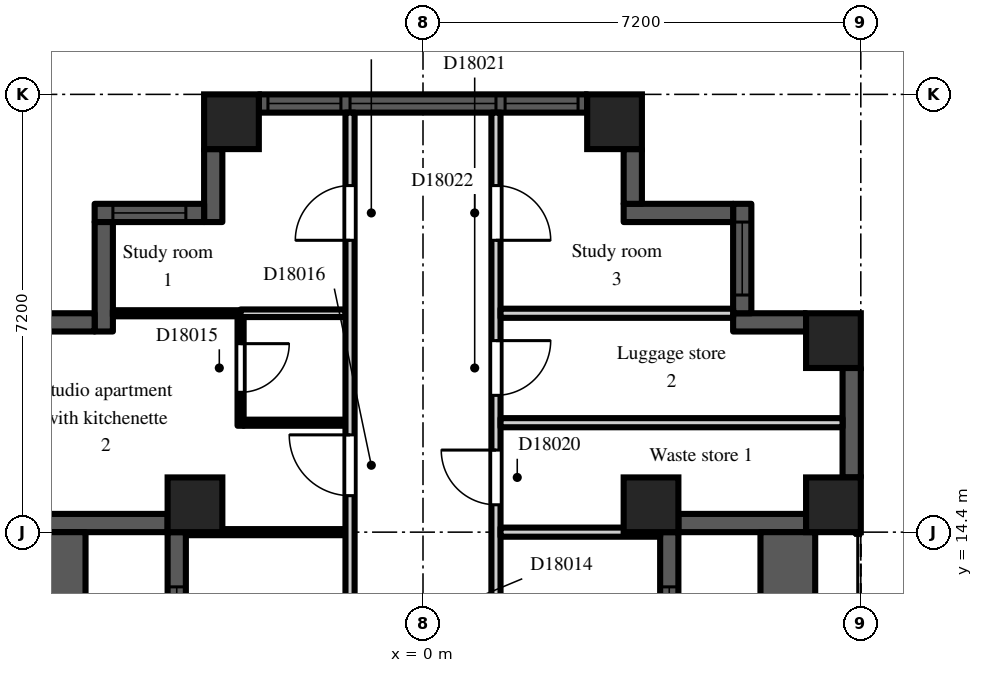
"""IFC4 building model, lengths in metres.
Left out: names, types, materials, properties, quantities, classifications, styles, units other than length and angle.
Written with IfcOpenShell. Run it as: python <this file> out.ifc"""

import sys

from ifc_helpers import new_model, si_unit, direction, frame, frame_2d, origin, origin_2d, place, context, subcontext, project, spatial, rectangle, extrude, element, fill, save


model = new_model("IFC4")
c1 = context("Model", 3, precision=1e-05, world=origin(), true_north=direction((0.0, 1.0)))
c2 = subcontext(c1, "Body", "Model", "MODEL_VIEW")
j1 = project(units=[si_unit("LENGTHUNIT", "METRE"), si_unit("PLANEANGLEUNIT", "RADIAN")], contexts=[c1])
p1 = place(None, origin())
s1 = spatial("IfcSite", under=j1, at=p1, CompositionType="ELEMENT")
p2 = place(p1, origin())
s2 = spatial("IfcBuilding", under=s1, at=p2, CompositionType="ELEMENT")
p3 = place(p2, frame((0.0, 0.0, 123.3)))
s3 = spatial("IfcBuildingStorey", under=s2, at=p3, CompositionType="ELEMENT", Elevation=123.3)
for number, where, z_axis, x_axis in (
    (1, (-3.75, 14.85, 0.0), (0.0, 0.0, 1.0), (1.0, 0.0, 0.0)),
    (2, (-3.15, 21.15, 0.0), (0.0, 0.0, 1.0), (1.0, 0.0, 0.0)),
    (3, (3.15, 21.15, 0.0), (0.0, 0.0, 1.0), (1.0, 0.0, 0.0)),
    (4, (3.75, 14.85, 0.0), (0.0, 0.0, 1.0), (1.0, 0.0, 0.0)),
    (5, (6.75, 14.85, 0.0), (0.0, 0.0, 1.0), (1.0, 0.0, 0.0)),
    (6, (6.75, 17.55, 0.0), (0.0, 0.0, 1.0), (1.0, 0.0, 0.0)),
):
    element("IfcColumn", number, at=place(p3, frame(where, z_axis=z_axis, x_axis=x_axis)), inside=s3, PredefinedType="COLUMN", context=c2, shape_type="SweptSolid", body=[
        extrude(rectangle(XDim=0.9, YDim=0.9, at=origin_2d()), origin(), (0.0, 0.0, 1.0), 3.0),
    ])
p4 = place(p3, frame((4.05, 7.2, 0.0), z_axis=(0.0, 0.0, 1.0), x_axis=(0.0, 1.0, 0.0)))
e7 = element("IfcWall", 7, at=p4, inside=s3, PredefinedType="SOLIDWALL", context=c2, shape_type="SweptSolid", body=[
    extrude(rectangle(XDim=7.2, YDim=0.3, at=frame_2d((3.6, 0.0))), origin(), (0.0, 0.0, 1.0), 2.2),
])
p5 = place(p4, frame((3.0, 0.0, 0.0)))
e8 = element("IfcOpeningElement", 8, at=p5, cuts=e7, PredefinedType="OPENING", context=c2, shape_type="SweptSolid", body=[
    extrude(rectangle(XDim=1.2, YDim=2.05, at=frame_2d((0.6, 1.025))), frame((0.0, 0.16, 0.0), z_axis=(0.0, -1.0, 0.0), x_axis=(1.0, 0.0, 0.0)), (0.0, 0.0, 1.0), 0.32),
])
p6 = place(p4, frame((0.9, 0.0, 0.2)))
e9 = element("IfcOpeningElement", 9, at=p6, cuts=e7, PredefinedType="OPENING", context=c2, shape_type="SweptSolid", body=[
    extrude(rectangle(XDim=1.8, YDim=1.85, at=frame_2d((0.9, 0.925))), frame((0.0, 0.16, 0.0), z_axis=(0.0, -1.0, 0.0), x_axis=(1.0, 0.0, 0.0)), (0.0, 0.0, 1.0), 0.32),
])
p7 = place(p4, frame((4.5, 0.0, 0.2)))
e10 = element("IfcOpeningElement", 10, at=p7, cuts=e7, PredefinedType="OPENING", context=c2, shape_type="SweptSolid", body=[
    extrude(rectangle(XDim=1.8, YDim=1.85, at=frame_2d((0.9, 0.925))), frame((0.0, 0.16, 0.0), z_axis=(0.0, -1.0, 0.0), x_axis=(1.0, 0.0, 0.0)), (0.0, 0.0, 1.0), 0.32),
])
p8 = place(p3, frame((4.2, 14.55, 0.0), z_axis=(0.0, 0.0, 1.0), x_axis=(1.0, 0.0, 0.0)))
e11 = element("IfcWall", 11, at=p8, inside=s3, PredefinedType="SOLIDWALL", context=c2, shape_type="SweptSolid", body=[
    extrude(rectangle(XDim=2.1, YDim=0.3, at=frame_2d((1.05, 0.0))), origin(), (0.0, 0.0, 1.0), 2.2),
])
p9 = place(p3, frame((7.05, 15.3, 0.0), z_axis=(0.0, 0.0, 1.0), x_axis=(0.0, 1.0, 0.0)))
e12 = element("IfcWall", 12, at=p9, inside=s3, PredefinedType="SOLIDWALL", context=c2, shape_type="SweptSolid", body=[
    extrude(rectangle(XDim=1.8, YDim=0.3, at=frame_2d((0.9, 0.0))), origin(), (0.0, 0.0, 1.0), 2.2),
])
p10 = place(p3, frame((6.3, 17.85, 0.0), z_axis=(0.0, 0.0, 1.0), x_axis=(-1.0, 0.0, 0.0)))
e13 = element("IfcWall", 13, at=p10, inside=s3, PredefinedType="SOLIDWALL", context=c2, shape_type="SweptSolid", body=[
    extrude(rectangle(XDim=1.2, YDim=0.3, at=frame_2d((0.6, 0.0))), origin(), (0.0, 0.0, 1.0), 2.6),
])
p11 = place(p3, frame((5.25, 18.0, 0.0), z_axis=(0.0, 0.0, 1.0), x_axis=(0.0, 1.0, 0.0)))
e14 = element("IfcWall", 14, at=p11, inside=s3, PredefinedType="SOLIDWALL", context=c2, shape_type="SweptSolid", body=[
    extrude(rectangle(XDim=1.8, YDim=0.3, at=frame_2d((0.9, 0.0))), origin(), (0.0, 0.0, 1.0), 2.6),
])
p12 = place(p11, frame((0.3, 0.0, 0.2)))
e15 = element("IfcOpeningElement", 15, at=p12, cuts=e14, PredefinedType="OPENING", context=c2, shape_type="SweptSolid", body=[
    extrude(rectangle(XDim=1.2, YDim=1.85, at=frame_2d((0.6, 0.925))), frame((0.0, 0.16, 0.0), z_axis=(0.0, -1.0, 0.0), x_axis=(1.0, 0.0, 0.0)), (0.0, 0.0, 1.0), 0.32),
])
p13 = place(p3, frame((5.1, 19.65, 0.0), z_axis=(0.0, 0.0, 1.0), x_axis=(-1.0, 0.0, 0.0)))
e16 = element("IfcWall", 16, at=p13, inside=s3, PredefinedType="SOLIDWALL", context=c2, shape_type="SweptSolid", body=[
    extrude(rectangle(XDim=1.8, YDim=0.3, at=frame_2d((0.9, 0.0))), origin(), (0.0, 0.0, 1.0), 2.6),
])
p14 = place(p3, frame((3.45, 19.8, 0.0), z_axis=(0.0, 0.0, 1.0), x_axis=(0.0, 1.0, 0.0)))
e17 = element("IfcWall", 17, at=p14, inside=s3, PredefinedType="SOLIDWALL", context=c2, shape_type="SweptSolid", body=[
    extrude(rectangle(XDim=0.9, YDim=0.3, at=frame_2d((0.45, 0.0))), origin(), (0.0, 0.0, 1.0), 2.6),
])
p15 = place(p3, frame((2.7, 21.45, 0.0), z_axis=(0.0, 0.0, 1.0), x_axis=(-1.0, 0.0, 0.0)))
e18 = element("IfcWall", 18, at=p15, inside=s3, PredefinedType="SOLIDWALL", context=c2, shape_type="SweptSolid", body=[
    extrude(rectangle(XDim=5.4, YDim=0.3, at=frame_2d((2.7, 0.0))), origin(), (0.0, 0.0, 1.0), 2.2),
])
p16 = place(p15, frame((1.5, 0.0, 0.2)))
e19 = element("IfcOpeningElement", 19, at=p16, cuts=e18, PredefinedType="OPENING", context=c2, shape_type="SweptSolid", body=[
    extrude(rectangle(XDim=2.4, YDim=1.85, at=frame_2d((1.2, 0.925))), frame((0.0, 0.16, 0.0), z_axis=(0.0, -1.0, 0.0), x_axis=(1.0, 0.0, 0.0)), (0.0, 0.0, 1.0), 0.32),
])
p17 = place(p15, frame((0.15, 0.0, 0.2)))
e20 = element("IfcOpeningElement", 20, at=p17, cuts=e18, PredefinedType="OPENING", context=c2, shape_type="SweptSolid", body=[
    extrude(rectangle(XDim=1.2, YDim=1.85, at=frame_2d((0.6, 0.925))), frame((0.0, 0.16, 0.0), z_axis=(0.0, -1.0, 0.0), x_axis=(1.0, 0.0, 0.0)), (0.0, 0.0, 1.0), 0.32),
])
p18 = place(p15, frame((4.05, 0.0, 0.2)))
e21 = element("IfcOpeningElement", 21, at=p18, cuts=e18, PredefinedType="OPENING", context=c2, shape_type="SweptSolid", body=[
    extrude(rectangle(XDim=1.2, YDim=1.85, at=frame_2d((0.6, 0.925))), frame((0.0, 0.16, 0.0), z_axis=(0.0, -1.0, 0.0), x_axis=(1.0, 0.0, 0.0)), (0.0, 0.0, 1.0), 0.32),
])
p19 = place(p3, frame((-3.45, 20.7, 0.0), z_axis=(0.0, 0.0, 1.0), x_axis=(0.0, -1.0, 0.0)))
e22 = element("IfcWall", 22, at=p19, inside=s3, PredefinedType="SOLIDWALL", context=c2, shape_type="SweptSolid", body=[
    extrude(rectangle(XDim=1.2, YDim=0.3, at=frame_2d((0.6, 0.0))), origin(), (0.0, 0.0, 1.0), 2.6),
])
p20 = place(p3, frame((-3.6, 19.65, 0.0), z_axis=(0.0, 0.0, 1.0), x_axis=(-1.0, 0.0, 0.0)))
e23 = element("IfcWall", 23, at=p20, inside=s3, PredefinedType="SOLIDWALL", context=c2, shape_type="SweptSolid", body=[
    extrude(rectangle(XDim=1.8, YDim=0.3, at=frame_2d((0.9, 0.0))), origin(), (0.0, 0.0, 1.0), 2.6),
])
p21 = place(p20, frame((0.3, 0.0, 0.2)))
e24 = element("IfcOpeningElement", 24, at=p21, cuts=e23, PredefinedType="OPENING", context=c2, shape_type="SweptSolid", body=[
    extrude(rectangle(XDim=1.2, YDim=1.85, at=frame_2d((0.6, 0.925))), frame((0.0, 0.16, 0.0), z_axis=(0.0, -1.0, 0.0), x_axis=(1.0, 0.0, 0.0)), (0.0, 0.0, 1.0), 0.32),
])
p22 = place(p3, frame((-5.25, 19.5, 0.0), z_axis=(0.0, 0.0, 1.0), x_axis=(0.0, -1.0, 0.0)))
e25 = element("IfcWall", 25, at=p22, inside=s3, PredefinedType="SOLIDWALL", context=c2, shape_type="SweptSolid", body=[
    extrude(rectangle(XDim=1.8, YDim=0.3, at=frame_2d((0.9, 0.0))), origin(), (0.0, 0.0, 1.0), 2.6),
])
p23 = place(p3, frame((-5.4, 17.85, 0.0), z_axis=(0.0, 0.0, 1.0), x_axis=(-1.0, 0.0, 0.0)))
e26 = element("IfcWall", 26, at=p23, inside=s3, PredefinedType="SOLIDWALL", context=c2, shape_type="SweptSolid", body=[
    extrude(rectangle(XDim=0.9, YDim=0.3, at=frame_2d((0.45, 0.0))), origin(), (0.0, 0.0, 1.0), 2.6),
])
p24 = place(p3, frame((-6.3, 14.55, 0.0), z_axis=(0.0, 0.0, 1.0), x_axis=(1.0, 0.0, 0.0)))
e27 = element("IfcWall", 27, at=p24, inside=s3, PredefinedType="SOLIDWALL", context=c2, shape_type="SweptSolid", body=[
    extrude(rectangle(XDim=2.1, YDim=0.3, at=frame_2d((1.05, 0.0))), origin(), (0.0, 0.0, 1.0), 2.2),
])
p25 = place(p3, frame((-4.05, 14.4, 0.0), z_axis=(0.0, 0.0, 1.0), x_axis=(0.0, -1.0, 0.0)))
e28 = element("IfcWall", 28, at=p25, inside=s3, PredefinedType="SOLIDWALL", context=c2, shape_type="SweptSolid", body=[
    extrude(rectangle(XDim=7.2, YDim=0.3, at=frame_2d((3.6, 0.0))), origin(), (0.0, 0.0, 1.0), 2.2),
])
p26 = place(p25, frame((3.0, 0.0, 0.0)))
e29 = element("IfcOpeningElement", 29, at=p26, cuts=e28, PredefinedType="OPENING", context=c2, shape_type="SweptSolid", body=[
    extrude(rectangle(XDim=1.2, YDim=2.05, at=frame_2d((0.6, 1.025))), frame((0.0, 0.16, 0.0), z_axis=(0.0, -1.0, 0.0), x_axis=(1.0, 0.0, 0.0)), (0.0, 0.0, 1.0), 0.32),
])
p27 = place(p25, frame((0.9, 0.0, 0.2)))
e30 = element("IfcOpeningElement", 30, at=p27, cuts=e28, PredefinedType="OPENING", context=c2, shape_type="SweptSolid", body=[
    extrude(rectangle(XDim=1.8, YDim=1.85, at=frame_2d((0.9, 0.925))), frame((0.0, 0.16, 0.0), z_axis=(0.0, -1.0, 0.0), x_axis=(1.0, 0.0, 0.0)), (0.0, 0.0, 1.0), 0.32),
])
p28 = place(p25, frame((4.5, 0.0, 0.2)))
e31 = element("IfcOpeningElement", 31, at=p28, cuts=e28, PredefinedType="OPENING", context=c2, shape_type="SweptSolid", body=[
    extrude(rectangle(XDim=1.8, YDim=1.85, at=frame_2d((0.9, 0.925))), frame((0.0, 0.16, 0.0), z_axis=(0.0, -1.0, 0.0), x_axis=(1.0, 0.0, 0.0)), (0.0, 0.0, 1.0), 0.32),
])
for number, where, z_axis, x_axis in (
    (32, (6.0, 7.2, 0.0), (0.0, 0.0, 1.0), (0.0, 1.0, 0.0)),
    (33, (-6.0, 7.2, 0.0), (0.0, 0.0, 1.0), (0.0, 1.0, 0.0)),
):
    element("IfcWall", number, at=place(p3, frame(where, z_axis=z_axis, x_axis=x_axis)), inside=s3, PredefinedType="PARAPET", context=c2, shape_type="SweptSolid", body=[
        extrude(rectangle(XDim=7.2, YDim=0.9, at=frame_2d((3.6, 0.0))), origin(), (0.0, 0.0, 1.0), 0.8),
    ])
p29 = place(p3, frame((-5.1, 18.0, 0.0), z_axis=(0.0, 0.0, 1.0), x_axis=(1.0, 0.0, 0.0)))
e34 = element("IfcWall", 34, at=p29, inside=s3, PredefinedType="PARTITIONING", context=c2, shape_type="SweptSolid", body=[
    extrude(rectangle(XDim=2.1, YDim=0.1, at=frame_2d((1.05, 0.0))), origin(), (0.0, 0.0, 1.0), 2.6),
])
p30 = place(p3, frame((-3.9, 14.4, 0.0), z_axis=(0.0, 0.0, 1.0), x_axis=(1.0, 0.0, 0.0)))
e35 = element("IfcWall", 35, at=p30, inside=s3, PredefinedType="PARTITIONING", context=c2, shape_type="SweptSolid", body=[
    extrude(rectangle(XDim=2.625, YDim=0.1, at=frame_2d((1.312, 0.0))), origin(), (0.0, 0.0, 1.0), 2.6),
])
p31 = place(p3, frame((-3.0, 16.15, 0.0), z_axis=(0.0, 0.0, 1.0), x_axis=(0.0, 1.0, 0.0)))
e36 = element("IfcWall", 36, at=p31, inside=s3, PredefinedType="PARTITIONING", context=c2, shape_type="SweptSolid", body=[
    extrude(rectangle(XDim=1.788, YDim=0.1, at=frame_2d((0.894, 0.0))), origin(), (0.0, 0.0, 1.0), 2.6),
])
p32 = place(p31, frame((0.55, 0.0, 0.0)))
e37 = element("IfcOpeningElement", 37, at=p32, cuts=e36, PredefinedType="OPENING", context=c2, shape_type="SweptSolid", body=[
    extrude(rectangle(XDim=0.8, YDim=2.1, at=frame_2d((0.4, 1.05))), frame((0.0, 0.06, 0.0), z_axis=(0.0, -1.0, 0.0), x_axis=(1.0, 0.0, 0.0)), (0.0, 0.0, 1.0), 0.12),
])
p33 = place(p3, frame((-2.95, 16.2, 0.0), z_axis=(0.0, 0.0, 1.0), x_axis=(1.0, 0.0, 0.0)))
e38 = element("IfcWall", 38, at=p33, inside=s3, PredefinedType="PARTITIONING", context=c2, shape_type="SweptSolid", body=[
    extrude(rectangle(XDim=1.675, YDim=0.1, at=frame_2d((0.837, 0.0))), origin(), (0.0, 0.0, 1.0), 2.6),
])
p34 = place(p3, frame((-3.0, 18.0, 0.0), z_axis=(0.0, 0.0, 1.0), x_axis=(1.0, 0.0, 0.0)))
e39 = element("IfcWall", 39, at=p34, inside=s3, PredefinedType="PARTITIONING", context=c2, shape_type="SweptSolid", body=[
    extrude(rectangle(XDim=1.725, YDim=0.125, at=frame_2d((0.863, 0.0))), origin(), (0.0, 0.0, 1.0), 2.6),
])
p35 = place(p3, frame((-1.2, 7.275, 0.0), z_axis=(0.0, 0.0, 1.0), x_axis=(0.0, 1.0, 0.0)))
e40 = element("IfcWall", 40, at=p35, inside=s3, PredefinedType="PARTITIONING", context=c2, shape_type="SweptSolid", body=[
    extrude(rectangle(XDim=14.025, YDim=0.15, at=frame_2d((7.013, 0.0))), origin(), (0.0, 0.0, 1.0), 2.6),
])
p36 = place(p35, frame((4.875, 0.0, 0.0)))
e41 = element("IfcOpeningElement", 41, at=p36, cuts=e40, PredefinedType="OPENING", context=c2, shape_type="SweptSolid", body=[
    extrude(rectangle(XDim=0.9, YDim=2.1, at=frame_2d((0.45, 1.05))), frame((0.0, 0.085, 0.0), z_axis=(0.0, -1.0, 0.0), x_axis=(1.0, 0.0, 0.0)), (0.0, 0.0, 1.0), 0.17),
])
p37 = place(p35, frame((7.725, 0.0, 0.0)))
e42 = element("IfcOpeningElement", 42, at=p37, cuts=e40, PredefinedType="OPENING", context=c2, shape_type="SweptSolid", body=[
    extrude(rectangle(XDim=1.0, YDim=2.1, at=frame_2d((0.5, 1.05))), frame((0.0, 0.085, 0.0), z_axis=(0.0, -1.0, 0.0), x_axis=(1.0, 0.0, 0.0)), (0.0, 0.0, 1.0), 0.17),
])
p38 = place(p35, frame((11.925, 0.0, 0.0)))
e43 = element("IfcOpeningElement", 43, at=p38, cuts=e40, PredefinedType="OPENING", context=c2, shape_type="SweptSolid", body=[
    extrude(rectangle(XDim=0.9, YDim=2.1, at=frame_2d((0.45, 1.05))), frame((0.0, 0.085, 0.0), z_axis=(0.0, -1.0, 0.0), x_axis=(1.0, 0.0, 0.0)), (0.0, 0.0, 1.0), 0.17),
])
p39 = place(p3, frame((1.2, 7.125, 0.0), z_axis=(0.0, 0.0, 1.0), x_axis=(0.0, 1.0, 0.0)))
e44 = element("IfcWall", 44, at=p39, inside=s3, PredefinedType="PARTITIONING", context=c2, shape_type="SweptSolid", body=[
    extrude(rectangle(XDim=14.175, YDim=0.15, at=frame_2d((7.087, 0.0))), origin(), (0.0, 0.0, 1.0), 2.6),
])
p40 = place(p39, frame((1.025, 0.0, 0.0)))
e45 = element("IfcOpeningElement", 45, at=p40, cuts=e44, PredefinedType="OPENING", context=c2, shape_type="SweptSolid", body=[
    extrude(rectangle(XDim=0.9, YDim=2.1, at=frame_2d((0.45, 1.05))), frame((0.0, 0.085, 0.0), z_axis=(0.0, -1.0, 0.0), x_axis=(1.0, 0.0, 0.0)), (0.0, 0.0, 1.0), 0.17),
])
p41 = place(p39, frame((4.625, 0.0, 0.0)))
e46 = element("IfcOpeningElement", 46, at=p41, cuts=e44, PredefinedType="OPENING", context=c2, shape_type="SweptSolid", body=[
    extrude(rectangle(XDim=0.9, YDim=2.1, at=frame_2d((0.45, 1.05))), frame((0.0, 0.085, 0.0), z_axis=(0.0, -1.0, 0.0), x_axis=(1.0, 0.0, 0.0)), (0.0, 0.0, 1.0), 0.17),
])
p42 = place(p39, frame((7.725, 0.0, 0.0)))
e47 = element("IfcOpeningElement", 47, at=p42, cuts=e44, PredefinedType="OPENING", context=c2, shape_type="SweptSolid", body=[
    extrude(rectangle(XDim=0.9, YDim=2.1, at=frame_2d((0.45, 1.05))), frame((0.0, 0.085, 0.0), z_axis=(0.0, -1.0, 0.0), x_axis=(1.0, 0.0, 0.0)), (0.0, 0.0, 1.0), 0.17),
])
p43 = place(p39, frame((9.525, 0.0, 0.0)))
e48 = element("IfcOpeningElement", 48, at=p43, cuts=e44, PredefinedType="OPENING", context=c2, shape_type="SweptSolid", body=[
    extrude(rectangle(XDim=0.9, YDim=2.1, at=frame_2d((0.45, 1.05))), frame((0.0, 0.085, 0.0), z_axis=(0.0, -1.0, 0.0), x_axis=(1.0, 0.0, 0.0)), (0.0, 0.0, 1.0), 0.17),
])
p44 = place(p39, frame((12.075, 0.0, 0.0)))
e49 = element("IfcOpeningElement", 49, at=p44, cuts=e44, PredefinedType="OPENING", context=c2, shape_type="SweptSolid", body=[
    extrude(rectangle(XDim=0.9, YDim=2.1, at=frame_2d((0.45, 1.05))), frame((0.0, 0.085, 0.0), z_axis=(0.0, -1.0, 0.0), x_axis=(1.0, 0.0, 0.0)), (0.0, 0.0, 1.0), 0.17),
])
p45 = place(p3, frame((1.275, 14.4, 0.0), z_axis=(0.0, 0.0, 1.0), x_axis=(1.0, 0.0, 0.0)))
e50 = element("IfcWall", 50, at=p45, inside=s3, PredefinedType="PARTITIONING", context=c2, shape_type="SweptSolid", body=[
    extrude(rectangle(XDim=2.625, YDim=0.15, at=frame_2d((1.312, 0.0))), origin(), (0.0, 0.0, 1.0), 2.6),
])
p46 = place(p3, frame((1.275, 16.2, 0.0), z_axis=(0.0, 0.0, 1.0), x_axis=(1.0, 0.0, 0.0)))
e51 = element("IfcWall", 51, at=p46, inside=s3, PredefinedType="PARTITIONING", context=c2, shape_type="SweptSolid", body=[
    extrude(rectangle(XDim=5.625, YDim=0.15, at=frame_2d((2.812, 0.0))), origin(), (0.0, 0.0, 1.0), 2.6),
])
p47 = place(p3, frame((1.275, 18.0, 0.0), z_axis=(0.0, 0.0, 1.0), x_axis=(1.0, 0.0, 0.0)))
e52 = element("IfcWall", 52, at=p47, inside=s3, PredefinedType="PARTITIONING", context=c2, shape_type="SweptSolid", body=[
    extrude(rectangle(XDim=3.825, YDim=0.15, at=frame_2d((1.913, 0.0))), origin(), (0.0, 0.0, 1.0), 2.6),
])
p48 = place(p7, origin())
e53 = element("IfcWindow", 53, at=p48, inside=s3, PartitioningType="SINGLE_PANEL", PredefinedType="WINDOW", context=c2, shape_type="SweptSolid", body=[
    extrude(rectangle(XDim=1.8, YDim=1.85, at=frame_2d((0.9, 0.925))), frame((0.0, 0.03, 0.0), z_axis=(0.0, -1.0, 0.0), x_axis=(1.0, 0.0, 0.0)), (0.0, 0.0, 1.0), 0.06),
])
fill(e10, e53)
p49 = place(p12, origin())
e54 = element("IfcWindow", 54, at=p49, inside=s3, PartitioningType="SINGLE_PANEL", PredefinedType="WINDOW", context=c2, shape_type="SweptSolid", body=[
    extrude(rectangle(XDim=1.2, YDim=1.85, at=frame_2d((0.6, 0.925))), frame((0.0, 0.03, 0.0), z_axis=(0.0, -1.0, 0.0), x_axis=(1.0, 0.0, 0.0)), (0.0, 0.0, 1.0), 0.06),
])
fill(e15, e54)
p50 = place(p16, origin())
e55 = element("IfcWindow", 55, at=p50, inside=s3, PartitioningType="SINGLE_PANEL", PredefinedType="WINDOW", context=c2, shape_type="SweptSolid", body=[
    extrude(rectangle(XDim=2.4, YDim=1.85, at=frame_2d((1.2, 0.925))), frame((0.0, 0.03, 0.0), z_axis=(0.0, -1.0, 0.0), x_axis=(1.0, 0.0, 0.0)), (0.0, 0.0, 1.0), 0.06),
])
fill(e19, e55)
p51 = place(p17, origin())
e56 = element("IfcWindow", 56, at=p51, inside=s3, PartitioningType="SINGLE_PANEL", PredefinedType="WINDOW", context=c2, shape_type="SweptSolid", body=[
    extrude(rectangle(XDim=1.2, YDim=1.85, at=frame_2d((0.6, 0.925))), frame((0.0, 0.03, 0.0), z_axis=(0.0, -1.0, 0.0), x_axis=(1.0, 0.0, 0.0)), (0.0, 0.0, 1.0), 0.06),
])
fill(e20, e56)
p52 = place(p18, origin())
e57 = element("IfcWindow", 57, at=p52, inside=s3, PartitioningType="SINGLE_PANEL", PredefinedType="WINDOW", context=c2, shape_type="SweptSolid", body=[
    extrude(rectangle(XDim=1.2, YDim=1.85, at=frame_2d((0.6, 0.925))), frame((0.0, 0.03, 0.0), z_axis=(0.0, -1.0, 0.0), x_axis=(1.0, 0.0, 0.0)), (0.0, 0.0, 1.0), 0.06),
])
fill(e21, e57)
p53 = place(p21, origin())
e58 = element("IfcWindow", 58, at=p53, inside=s3, PartitioningType="SINGLE_PANEL", PredefinedType="WINDOW", context=c2, shape_type="SweptSolid", body=[
    extrude(rectangle(XDim=1.2, YDim=1.85, at=frame_2d((0.6, 0.925))), frame((0.0, 0.03, 0.0), z_axis=(0.0, -1.0, 0.0), x_axis=(1.0, 0.0, 0.0)), (0.0, 0.0, 1.0), 0.06),
])
fill(e24, e58)
p54 = place(p27, origin())
e59 = element("IfcWindow", 59, at=p54, inside=s3, PartitioningType="SINGLE_PANEL", PredefinedType="WINDOW", context=c2, shape_type="SweptSolid", body=[
    extrude(rectangle(XDim=1.8, YDim=1.85, at=frame_2d((0.9, 0.925))), frame((0.0, 0.03, 0.0), z_axis=(0.0, -1.0, 0.0), x_axis=(1.0, 0.0, 0.0)), (0.0, 0.0, 1.0), 0.06),
])
fill(e30, e59)
p55 = place(p32, frame((0.8, 0.0, 0.0), z_axis=(0.0, 0.0, 1.0), x_axis=(-1.0, 0.0, 0.0)))
e60 = element("IfcDoor", 60, at=p55, inside=s3, OperationType="SINGLE_SWING_LEFT", PredefinedType="DOOR", context=c2, shape_type="SweptSolid", body=[
    extrude(rectangle(XDim=0.8, YDim=2.1, at=frame_2d((0.4, 1.05))), frame((0.0, 0.025, 0.0), z_axis=(0.0, -1.0, 0.0), x_axis=(1.0, 0.0, 0.0)), (0.0, 0.0, 1.0), 0.05),
])
fill(e37, e60)
p56 = place(p37, origin())
e61 = element("IfcDoor", 61, at=p56, inside=s3, OperationType="SINGLE_SWING_RIGHT", PredefinedType="DOOR", context=c2, shape_type="SweptSolid", body=[
    extrude(rectangle(XDim=1.0, YDim=2.1, at=frame_2d((0.5, 1.05))), frame((0.0, 0.025, 0.0), z_axis=(0.0, -1.0, 0.0), x_axis=(1.0, 0.0, 0.0)), (0.0, 0.0, 1.0), 0.05),
])
fill(e42, e61)
p57 = place(p38, origin())
e62 = element("IfcDoor", 62, at=p57, inside=s3, OperationType="SINGLE_SWING_LEFT", PredefinedType="DOOR", context=c2, shape_type="SweptSolid", body=[
    extrude(rectangle(XDim=0.9, YDim=2.1, at=frame_2d((0.45, 1.05))), frame((0.0, 0.025, 0.0), z_axis=(0.0, -1.0, 0.0), x_axis=(1.0, 0.0, 0.0)), (0.0, 0.0, 1.0), 0.05),
])
fill(e43, e62)
p58 = place(p42, origin())
e63 = element("IfcDoor", 63, at=p58, inside=s3, OperationType="SINGLE_SWING_RIGHT", PredefinedType="DOOR", context=c2, shape_type="SweptSolid", body=[
    extrude(rectangle(XDim=0.9, YDim=2.1, at=frame_2d((0.45, 1.05))), frame((0.0, 0.025, 0.0), z_axis=(0.0, -1.0, 0.0), x_axis=(1.0, 0.0, 0.0)), (0.0, 0.0, 1.0), 0.05),
])
fill(e47, e63)
p59 = place(p43, frame((0.9, 0.0, 0.0), z_axis=(0.0, 0.0, 1.0), x_axis=(-1.0, 0.0, 0.0)))
e64 = element("IfcDoor", 64, at=p59, inside=s3, OperationType="SINGLE_SWING_LEFT", PredefinedType="DOOR", context=c2, shape_type="SweptSolid", body=[
    extrude(rectangle(XDim=0.9, YDim=2.1, at=frame_2d((0.45, 1.05))), frame((0.0, 0.025, 0.0), z_axis=(0.0, -1.0, 0.0), x_axis=(1.0, 0.0, 0.0)), (0.0, 0.0, 1.0), 0.05),
])
fill(e48, e64)
p60 = place(p44, frame((0.9, 0.0, 0.0), z_axis=(0.0, 0.0, 1.0), x_axis=(-1.0, 0.0, 0.0)))
e65 = element("IfcDoor", 65, at=p60, inside=s3, OperationType="SINGLE_SWING_RIGHT", PredefinedType="DOOR", context=c2, shape_type="SweptSolid", body=[
    extrude(rectangle(XDim=0.9, YDim=2.1, at=frame_2d((0.45, 1.05))), frame((0.0, 0.025, 0.0), z_axis=(0.0, -1.0, 0.0), x_axis=(1.0, 0.0, 0.0)), (0.0, 0.0, 1.0), 0.05),
])
fill(e49, e65)
save(model, sys.argv[1])
